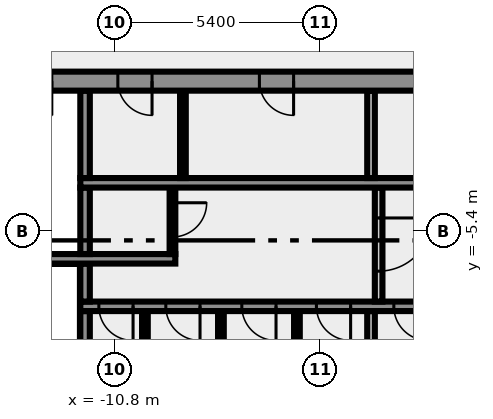
"""IFC4 building model, lengths in metres.
Left out: names, types, materials, properties, quantities, classifications, styles, units other than length and angle.
Written with IfcOpenShell. Run it as: python <this file> out.ifc"""

import sys

from ifc_helpers import new_model, si_unit, direction, frame, frame_2d, origin, place, context, subcontext, project, spatial, rectangle, extrude, element, fill, save


model = new_model("IFC4")
c1 = context("Model", 3, precision=1e-05, world=origin(), true_north=direction((0.0, 1.0)))
c2 = subcontext(c1, "Body", "Model", "MODEL_VIEW")
j1 = project(units=[si_unit("LENGTHUNIT", "METRE"), si_unit("PLANEANGLEUNIT", "RADIAN")], contexts=[c1])
p1 = place(None, origin())
s1 = spatial("IfcSite", under=j1, at=p1, CompositionType="ELEMENT")
p2 = place(p1, origin())
s2 = spatial("IfcBuilding", under=s1, at=p2, CompositionType="ELEMENT")
p3 = place(p2, frame((0.0, 0.0, 202.0)))
s3 = spatial("IfcBuildingStorey", under=s2, at=p3, CompositionType="ELEMENT", Elevation=202.0)
p4 = place(p3, frame((-11.575, -10.5, 0.0), z_axis=(0.0, 0.0, 1.0), x_axis=(0.0, 1.0, 0.0)))
e1 = element("IfcWall", 1, at=p4, inside=s3, PredefinedType="SHEAR", context=c2, shape_type="SweptSolid", body=[
    extrude(rectangle(XDim=3.0, YDim=0.25, at=frame_2d((1.5, 0.0))), origin(), (0.0, 0.0, 1.0), 3.65),
])
for number, where, z_axis, x_axis in (
    (2, (-10.0, -10.5, 0.0), (0.0, 0.0, 1.0), (0.0, 1.0, 0.0)),
    (3, (-8.0, -10.5, 0.0), (0.0, 0.0, 1.0), (0.0, 1.0, 0.0)),
    (4, (-6.0, -10.5, 0.0), (0.0, 0.0, 1.0), (0.0, 1.0, 0.0)),
):
    element("IfcWall", number, at=place(p3, frame(where, z_axis=z_axis, x_axis=x_axis)), inside=s3, PredefinedType="PARTITIONING", context=c2, shape_type="SweptSolid", body=[
        extrude(rectangle(XDim=3.0, YDim=0.15, at=frame_2d((1.5, 0.0))), origin(), (0.0, 0.0, 1.0), 3.65),
    ])
p5 = place(p3, frame((-4.05, -10.5, 0.0), z_axis=(0.0, 0.0, 1.0), x_axis=(0.0, 1.0, 0.0)))
e5 = element("IfcWall", 5, at=p5, inside=s3, PredefinedType="SOLIDWALL", context=c2, shape_type="SweptSolid", body=[
    extrude(rectangle(XDim=3.0, YDim=0.2, at=frame_2d((1.5, 0.0))), origin(), (0.0, 0.0, 1.0), 3.65),
])
p6 = place(p3, frame((11.7, -7.375, 0.0), z_axis=(0.0, 0.0, 1.0), x_axis=(-1.0, 0.0, 0.0)))
e6 = element("IfcWall", 6, at=p6, inside=s3, PredefinedType="SHEAR", context=c2, shape_type="SweptSolid", body=[
    extrude(rectangle(XDim=23.4, YDim=0.25, at=frame_2d((11.7, 0.0))), origin(), (0.0, 0.0, 1.0), 3.65),
])
p7 = place(p6, frame((22.012, 0.0, 0.0)))
e7 = element("IfcOpeningElement", 7, at=p7, cuts=e6, PredefinedType="OPENING", context=c2, shape_type="SweptSolid", body=[
    extrude(rectangle(XDim=0.9, YDim=2.1, at=frame_2d((0.45, 1.05))), frame((0.0, 0.135, 0.0), z_axis=(0.0, -1.0, 0.0), x_axis=(1.0, 0.0, 0.0)), (0.0, 0.0, 1.0), 0.27),
])
p8 = place(p6, frame((20.25, 0.0, 0.0)))
e8 = element("IfcOpeningElement", 8, at=p8, cuts=e6, PredefinedType="OPENING", context=c2, shape_type="SweptSolid", body=[
    extrude(rectangle(XDim=0.9, YDim=2.1, at=frame_2d((0.45, 1.05))), frame((0.0, 0.135, 0.0), z_axis=(0.0, -1.0, 0.0), x_axis=(1.0, 0.0, 0.0)), (0.0, 0.0, 1.0), 0.27),
])
p9 = place(p6, frame((18.25, 0.0, 0.0)))
e9 = element("IfcOpeningElement", 9, at=p9, cuts=e6, PredefinedType="OPENING", context=c2, shape_type="SweptSolid", body=[
    extrude(rectangle(XDim=0.9, YDim=2.1, at=frame_2d((0.45, 1.05))), frame((0.0, 0.135, 0.0), z_axis=(0.0, -1.0, 0.0), x_axis=(1.0, 0.0, 0.0)), (0.0, 0.0, 1.0), 0.27),
])
p10 = place(p6, frame((16.287, 0.0, 0.0)))
e10 = element("IfcOpeningElement", 10, at=p10, cuts=e6, PredefinedType="OPENING", context=c2, shape_type="SweptSolid", body=[
    extrude(rectangle(XDim=0.9, YDim=2.1, at=frame_2d((0.45, 1.05))), frame((0.0, 0.135, 0.0), z_axis=(0.0, -1.0, 0.0), x_axis=(1.0, 0.0, 0.0)), (0.0, 0.0, 1.0), 0.27),
])
p11 = place(p6, frame((14.25, 0.0, 0.0)))
e11 = element("IfcOpeningElement", 11, at=p11, cuts=e6, PredefinedType="OPENING", context=c2, shape_type="SweptSolid", body=[
    extrude(rectangle(XDim=0.9, YDim=2.1, at=frame_2d((0.45, 1.05))), frame((0.0, 0.135, 0.0), z_axis=(0.0, -1.0, 0.0), x_axis=(1.0, 0.0, 0.0)), (0.0, 0.0, 1.0), 0.27),
])
p12 = place(p6, frame((12.125, 0.0, 0.0)))
e12 = element("IfcOpeningElement", 12, at=p12, cuts=e6, PredefinedType="OPENING", context=c2, shape_type="SweptSolid", body=[
    extrude(rectangle(XDim=0.9, YDim=2.1, at=frame_2d((0.45, 1.05))), frame((0.0, 0.135, 0.0), z_axis=(0.0, -1.0, 0.0), x_axis=(1.0, 0.0, 0.0)), (0.0, 0.0, 1.0), 0.27),
])
p13 = place(p6, frame((10.45, 0.0, 0.0)))
e13 = element("IfcOpeningElement", 13, at=p13, cuts=e6, PredefinedType="OPENING", context=c2, shape_type="SweptSolid", body=[
    extrude(rectangle(XDim=0.75, YDim=2.1, at=frame_2d((0.375, 1.05))), frame((0.0, 0.135, 0.0), z_axis=(0.0, -1.0, 0.0), x_axis=(1.0, 0.0, 0.0)), (0.0, 0.0, 1.0), 0.27),
])
p14 = place(p6, frame((8.35, 0.0, 0.0)))
e14 = element("IfcOpeningElement", 14, at=p14, cuts=e6, PredefinedType="OPENING", context=c2, shape_type="SweptSolid", body=[
    extrude(rectangle(XDim=1.1, YDim=2.1, at=frame_2d((0.55, 1.05))), frame((0.0, 0.135, 0.0), z_axis=(0.0, -1.0, 0.0), x_axis=(1.0, 0.0, 0.0)), (0.0, 0.0, 1.0), 0.27),
])
p15 = place(p6, frame((5.85, 0.0, 0.0)))
e15 = element("IfcOpeningElement", 15, at=p15, cuts=e6, PredefinedType="OPENING", context=c2, shape_type="SweptSolid", body=[
    extrude(rectangle(XDim=1.1, YDim=2.1, at=frame_2d((0.55, 1.05))), frame((0.0, 0.135, 0.0), z_axis=(0.0, -1.0, 0.0), x_axis=(1.0, 0.0, 0.0)), (0.0, 0.0, 1.0), 0.27),
])
p16 = place(p6, frame((3.35, 0.0, 0.0)))
e16 = element("IfcOpeningElement", 16, at=p16, cuts=e6, PredefinedType="OPENING", context=c2, shape_type="SweptSolid", body=[
    extrude(rectangle(XDim=1.1, YDim=2.1, at=frame_2d((0.55, 1.05))), frame((0.0, 0.135, 0.0), z_axis=(0.0, -1.0, 0.0), x_axis=(1.0, 0.0, 0.0)), (0.0, 0.0, 1.0), 0.27),
])
p17 = place(p6, frame((0.85, 0.0, 0.0)))
e17 = element("IfcOpeningElement", 17, at=p17, cuts=e6, PredefinedType="OPENING", context=c2, shape_type="SweptSolid", body=[
    extrude(rectangle(XDim=1.1, YDim=2.1, at=frame_2d((0.55, 1.05))), frame((0.0, 0.135, 0.0), z_axis=(0.0, -1.0, 0.0), x_axis=(1.0, 0.0, 0.0)), (0.0, 0.0, 1.0), 0.27),
])
p18 = place(p3, frame((-11.575, -7.25, 0.0), z_axis=(0.0, 0.0, 1.0), x_axis=(0.0, 1.0, 0.0)))
e18 = element("IfcWall", 18, at=p18, inside=s3, PredefinedType="SHEAR", context=c2, shape_type="SweptSolid", body=[
    extrude(rectangle(XDim=1.0, YDim=0.25, at=frame_2d((0.5, 0.0))), origin(), (0.0, 0.0, 1.0), 3.65),
])
p19 = place(p3, frame((-3.85, -4.25, 0.0), z_axis=(0.0, 0.0, 1.0), x_axis=(0.0, -1.0, 0.0)))
e19 = element("IfcWall", 19, at=p19, inside=s3, PredefinedType="SOLIDWALL", context=c2, shape_type="SweptSolid", body=[
    extrude(rectangle(XDim=3.0, YDim=0.2, at=frame_2d((1.5, 0.0))), origin(), (0.0, 0.0, 1.0), 3.65),
])
p20 = place(p19, frame((0.8, 0.0, 0.0)))
e20 = element("IfcOpeningElement", 20, at=p20, cuts=e19, PredefinedType="OPENING", context=c2, shape_type="SweptSolid", body=[
    extrude(rectangle(XDim=1.4, YDim=2.1, at=frame_2d((0.7, 1.05))), frame((0.0, 0.11, 0.0), z_axis=(0.0, -1.0, 0.0), x_axis=(1.0, 0.0, 0.0)), (0.0, 0.0, 1.0), 0.22),
])
p21 = place(p3, frame((-9.2, -6.125, 0.0), z_axis=(0.0, 0.0, 1.0), x_axis=(-1.0, 0.0, 0.0)))
e21 = element("IfcWall", 21, at=p21, inside=s3, PredefinedType="SHEAR", context=c2, shape_type="SweptSolid", body=[
    extrude(rectangle(XDim=10.8, YDim=0.25, at=frame_2d((5.4, 0.0))), origin(), (0.0, 0.0, 1.0), 3.65),
])
p22 = place(p21, frame((8.45, 0.0, 0.0)))
e22 = element("IfcOpeningElement", 22, at=p22, cuts=e21, PredefinedType="OPENING", context=c2, shape_type="SweptSolid", body=[
    extrude(rectangle(XDim=1.8, YDim=2.1, at=frame_2d((0.9, 1.05))), frame((0.0, 0.135, 0.0), z_axis=(0.0, -1.0, 0.0), x_axis=(1.0, 0.0, 0.0)), (0.0, 0.0, 1.0), 0.27),
])
p23 = place(p3, frame((-11.575, -6.0, 0.0), z_axis=(0.0, 0.0, 1.0), x_axis=(0.0, 1.0, 0.0)))
e23 = element("IfcWall", 23, at=p23, inside=s3, PredefinedType="SHEAR", context=c2, shape_type="SweptSolid", body=[
    extrude(rectangle(XDim=1.75, YDim=0.25, at=frame_2d((0.875, 0.0))), origin(), (0.0, 0.0, 1.0), 3.65),
])
p24 = place(p3, frame((-9.275, -4.25, 0.0), z_axis=(0.0, 0.0, 1.0), x_axis=(0.0, -1.0, 0.0)))
e24 = element("IfcWall", 24, at=p24, inside=s3, PredefinedType="PARTITIONING", context=c2, shape_type="SweptSolid", body=[
    extrude(rectangle(XDim=1.75, YDim=0.15, at=frame_2d((0.875, 0.0))), origin(), (0.0, 0.0, 1.0), 3.65),
])
p25 = place(p24, frame((0.4, 0.0, 0.0)))
e25 = element("IfcOpeningElement", 25, at=p25, cuts=e24, PredefinedType="OPENING", context=c2, shape_type="SweptSolid", body=[
    extrude(rectangle(XDim=0.9, YDim=2.1, at=frame_2d((0.45, 1.05))), frame((0.0, 0.085, 0.0), z_axis=(0.0, -1.0, 0.0), x_axis=(1.0, 0.0, 0.0)), (0.0, 0.0, 1.0), 0.17),
])
p26 = place(p3, frame((-11.7, -4.125, 0.0), z_axis=(0.0, 0.0, 1.0), x_axis=(1.0, 0.0, 0.0)))
e26 = element("IfcWall", 26, at=p26, inside=s3, PredefinedType="SHEAR", context=c2, shape_type="SweptSolid", body=[
    extrude(rectangle(XDim=10.05, YDim=0.25, at=frame_2d((5.025, 0.0))), origin(), (0.0, 0.0, 1.0), 3.65),
])
p27 = place(p3, frame((-11.575, -4.0, 0.0), z_axis=(0.0, 0.0, 1.0), x_axis=(0.0, 1.0, 0.0)))
e27 = element("IfcWall", 27, at=p27, inside=s3, PredefinedType="SHEAR", context=c2, shape_type="SweptSolid", body=[
    extrude(rectangle(XDim=2.3, YDim=0.25, at=frame_2d((1.15, 0.0))), origin(), (0.0, 0.0, 1.0), 3.65),
])
p28 = place(p3, frame((-9.0, -4.0, 0.0), z_axis=(0.0, 0.0, 1.0), x_axis=(0.0, 1.0, 0.0)))
e28 = element("IfcWall", 28, at=p28, inside=s3, PredefinedType="PARTITIONING", context=c2, shape_type="SweptSolid", body=[
    extrude(rectangle(XDim=2.3, YDim=0.15, at=frame_2d((1.15, 0.0))), origin(), (0.0, 0.0, 1.0), 3.65),
])
p29 = place(p3, frame((-4.05, -4.0, 0.0), z_axis=(0.0, 0.0, 1.0), x_axis=(0.0, 1.0, 0.0)))
e29 = element("IfcWall", 29, at=p29, inside=s3, PredefinedType="SOLIDWALL", context=c2, shape_type="SweptSolid", body=[
    extrude(rectangle(XDim=2.3, YDim=0.2, at=frame_2d((1.15, 0.0))), origin(), (0.0, 0.0, 1.0), 3.65),
])
p30 = place(p3, frame((20.49, -1.45, 0.0), z_axis=(0.0, 0.0, 1.0), x_axis=(-1.0, 0.0, 0.0)))
e30 = element("IfcWall", 30, at=p30, inside=s3, PredefinedType="SHEAR", context=c2, shape_type="SweptSolid", body=[
    extrude(rectangle(XDim=40.98, YDim=0.5, at=frame_2d((20.49, 0.0))), origin(), (0.0, 0.0, 1.0), 3.65),
])
p31 = place(p30, frame((38.14, 0.0, 0.0)))
e31 = element("IfcOpeningElement", 31, at=p31, cuts=e30, PredefinedType="OPENING", context=c2, shape_type="SweptSolid", body=[
    extrude(rectangle(XDim=1.8, YDim=2.1, at=frame_2d((0.9, 1.05))), frame((0.0, 0.26, 0.0), z_axis=(0.0, -1.0, 0.0), x_axis=(1.0, 0.0, 0.0)), (0.0, 0.0, 1.0), 0.52),
])
p32 = place(p30, frame((35.89, 0.0, 0.0)))
e32 = element("IfcOpeningElement", 32, at=p32, cuts=e30, PredefinedType="OPENING", context=c2, shape_type="SweptSolid", body=[
    extrude(rectangle(XDim=0.9, YDim=2.1, at=frame_2d((0.45, 1.05))), frame((0.0, 0.26, 0.0), z_axis=(0.0, -1.0, 0.0), x_axis=(1.0, 0.0, 0.0)), (0.0, 0.0, 1.0), 0.52),
])
p33 = place(p30, frame((32.94, 0.0, 0.0)))
e33 = element("IfcOpeningElement", 33, at=p33, cuts=e30, PredefinedType="OPENING", context=c2, shape_type="SweptSolid", body=[
    extrude(rectangle(XDim=0.9, YDim=2.1, at=frame_2d((0.45, 1.05))), frame((0.0, 0.26, 0.0), z_axis=(0.0, -1.0, 0.0), x_axis=(1.0, 0.0, 0.0)), (0.0, 0.0, 1.0), 0.52),
])
p34 = place(p30, frame((30.302, 0.0, 0.0)))
e34 = element("IfcOpeningElement", 34, at=p34, cuts=e30, PredefinedType="OPENING", context=c2, shape_type="SweptSolid", body=[
    extrude(rectangle(XDim=0.9, YDim=2.1, at=frame_2d((0.45, 1.05))), frame((0.0, 0.26, 0.0), z_axis=(0.0, -1.0, 0.0), x_axis=(1.0, 0.0, 0.0)), (0.0, 0.0, 1.0), 0.52),
])
p35 = place(p30, frame((26.577, 0.0, 0.0)))
e35 = element("IfcOpeningElement", 35, at=p35, cuts=e30, PredefinedType="OPENING", context=c2, shape_type="SweptSolid", body=[
    extrude(rectangle(XDim=0.9, YDim=2.1, at=frame_2d((0.45, 1.05))), frame((0.0, 0.26, 0.0), z_axis=(0.0, -1.0, 0.0), x_axis=(1.0, 0.0, 0.0)), (0.0, 0.0, 1.0), 0.52),
])
p36 = place(p30, frame((19.59, 0.0, 0.0)))
e36 = element("IfcOpeningElement", 36, at=p36, cuts=e30, PredefinedType="OPENING", context=c2, shape_type="SweptSolid", body=[
    extrude(rectangle(XDim=2.0, YDim=2.1, at=frame_2d((1.0, 1.05))), frame((0.0, 0.26, 0.0), z_axis=(0.0, -1.0, 0.0), x_axis=(1.0, 0.0, 0.0)), (0.0, 0.0, 1.0), 0.52),
])
p37 = place(p30, frame((7.14, 0.0, 0.0)))
e37 = element("IfcOpeningElement", 37, at=p37, cuts=e30, PredefinedType="OPENING", context=c2, shape_type="SweptSolid", body=[
    extrude(rectangle(XDim=0.9, YDim=2.1, at=frame_2d((0.45, 1.05))), frame((0.0, 0.26, 0.0), z_axis=(0.0, -1.0, 0.0), x_axis=(1.0, 0.0, 0.0)), (0.0, 0.0, 1.0), 0.52),
])
p38 = place(p30, frame((5.028, 0.0, 0.0)))
e38 = element("IfcOpeningElement", 38, at=p38, cuts=e30, PredefinedType="OPENING", context=c2, shape_type="SweptSolid", body=[
    extrude(rectangle(XDim=0.8, YDim=2.1, at=frame_2d((0.4, 1.05))), frame((0.0, 0.26, 0.0), z_axis=(0.0, -1.0, 0.0), x_axis=(1.0, 0.0, 0.0)), (0.0, 0.0, 1.0), 0.52),
])
p39 = place(p30, frame((3.452, 0.0, 0.0)))
e39 = element("IfcOpeningElement", 39, at=p39, cuts=e30, PredefinedType="OPENING", context=c2, shape_type="SweptSolid", body=[
    extrude(rectangle(XDim=0.8, YDim=2.1, at=frame_2d((0.4, 1.05))), frame((0.0, 0.26, 0.0), z_axis=(0.0, -1.0, 0.0), x_axis=(1.0, 0.0, 0.0)), (0.0, 0.0, 1.0), 0.52),
])
p40 = place(p30, frame((1.04, 0.0, 0.0)))
e40 = element("IfcOpeningElement", 40, at=p40, cuts=e30, PredefinedType="OPENING", context=c2, shape_type="SweptSolid", body=[
    extrude(rectangle(XDim=1.8, YDim=2.1, at=frame_2d((0.9, 1.05))), frame((0.0, 0.26, 0.0), z_axis=(0.0, -1.0, 0.0), x_axis=(1.0, 0.0, 0.0)), (0.0, 0.0, 1.0), 0.52),
])
p41 = place(p7, origin())
e41 = element("IfcDoor", 41, at=p41, inside=s3, OperationType="SINGLE_SWING_RIGHT", PredefinedType="DOOR", context=c2, shape_type="SweptSolid", body=[
    extrude(rectangle(XDim=0.9, YDim=2.1, at=frame_2d((0.45, 1.05))), frame((0.0, 0.025, 0.0), z_axis=(0.0, -1.0, 0.0), x_axis=(1.0, 0.0, 0.0)), (0.0, 0.0, 1.0), 0.05),
])
fill(e7, e41)
p42 = place(p8, origin())
e42 = element("IfcDoor", 42, at=p42, inside=s3, OperationType="SINGLE_SWING_RIGHT", PredefinedType="DOOR", context=c2, shape_type="SweptSolid", body=[
    extrude(rectangle(XDim=0.9, YDim=2.1, at=frame_2d((0.45, 1.05))), frame((0.0, 0.025, 0.0), z_axis=(0.0, -1.0, 0.0), x_axis=(1.0, 0.0, 0.0)), (0.0, 0.0, 1.0), 0.05),
])
fill(e8, e42)
p43 = place(p9, origin())
e43 = element("IfcDoor", 43, at=p43, inside=s3, OperationType="SINGLE_SWING_RIGHT", PredefinedType="DOOR", context=c2, shape_type="SweptSolid", body=[
    extrude(rectangle(XDim=0.9, YDim=2.1, at=frame_2d((0.45, 1.05))), frame((0.0, 0.025, 0.0), z_axis=(0.0, -1.0, 0.0), x_axis=(1.0, 0.0, 0.0)), (0.0, 0.0, 1.0), 0.05),
])
fill(e9, e43)
p44 = place(p10, origin())
e44 = element("IfcDoor", 44, at=p44, inside=s3, OperationType="SINGLE_SWING_RIGHT", PredefinedType="DOOR", context=c2, shape_type="SweptSolid", body=[
    extrude(rectangle(XDim=0.9, YDim=2.1, at=frame_2d((0.45, 1.05))), frame((0.0, 0.025, 0.0), z_axis=(0.0, -1.0, 0.0), x_axis=(1.0, 0.0, 0.0)), (0.0, 0.0, 1.0), 0.05),
])
fill(e10, e44)
p45 = place(p11, origin())
e45 = element("IfcDoor", 45, at=p45, inside=s3, OperationType="SINGLE_SWING_RIGHT", PredefinedType="DOOR", context=c2, shape_type="SweptSolid", body=[
    extrude(rectangle(XDim=0.9, YDim=2.1, at=frame_2d((0.45, 1.05))), frame((0.0, 0.025, 0.0), z_axis=(0.0, -1.0, 0.0), x_axis=(1.0, 0.0, 0.0)), (0.0, 0.0, 1.0), 0.05),
])
fill(e11, e45)
p46 = place(p20, origin())
e46 = element("IfcDoor", 46, at=p46, inside=s3, OperationType="DOUBLE_DOOR_SINGLE_SWING", PredefinedType="DOOR", context=c2, shape_type="SweptSolid", body=[
    extrude(rectangle(XDim=1.4, YDim=2.1, at=frame_2d((0.7, 1.05))), frame((0.0, 0.025, 0.0), z_axis=(0.0, -1.0, 0.0), x_axis=(1.0, 0.0, 0.0)), (0.0, 0.0, 1.0), 0.05),
])
fill(e20, e46)
p47 = place(p25, origin())
e47 = element("IfcDoor", 47, at=p47, inside=s3, OperationType="SINGLE_SWING_LEFT", PredefinedType="DOOR", context=c2, shape_type="SweptSolid", body=[
    extrude(rectangle(XDim=0.9, YDim=2.1, at=frame_2d((0.45, 1.05))), frame((0.0, 0.025, 0.0), z_axis=(0.0, -1.0, 0.0), x_axis=(1.0, 0.0, 0.0)), (0.0, 0.0, 1.0), 0.05),
])
fill(e25, e47)
p48 = place(p34, origin())
e48 = element("IfcDoor", 48, at=p48, inside=s3, OperationType="SINGLE_SWING_RIGHT", PredefinedType="DOOR", context=c2, shape_type="SweptSolid", body=[
    extrude(rectangle(XDim=0.9, YDim=2.1, at=frame_2d((0.45, 1.05))), frame((0.0, 0.025, 0.0), z_axis=(0.0, -1.0, 0.0), x_axis=(1.0, 0.0, 0.0)), (0.0, 0.0, 1.0), 0.05),
])
fill(e34, e48)
p49 = place(p35, origin())
e49 = element("IfcDoor", 49, at=p49, inside=s3, OperationType="SINGLE_SWING_RIGHT", PredefinedType="DOOR", context=c2, shape_type="SweptSolid", body=[
    extrude(rectangle(XDim=0.9, YDim=2.1, at=frame_2d((0.45, 1.05))), frame((0.0, 0.025, 0.0), z_axis=(0.0, -1.0, 0.0), x_axis=(1.0, 0.0, 0.0)), (0.0, 0.0, 1.0), 0.05),
])
fill(e35, e49)
save(model, sys.argv[1])
